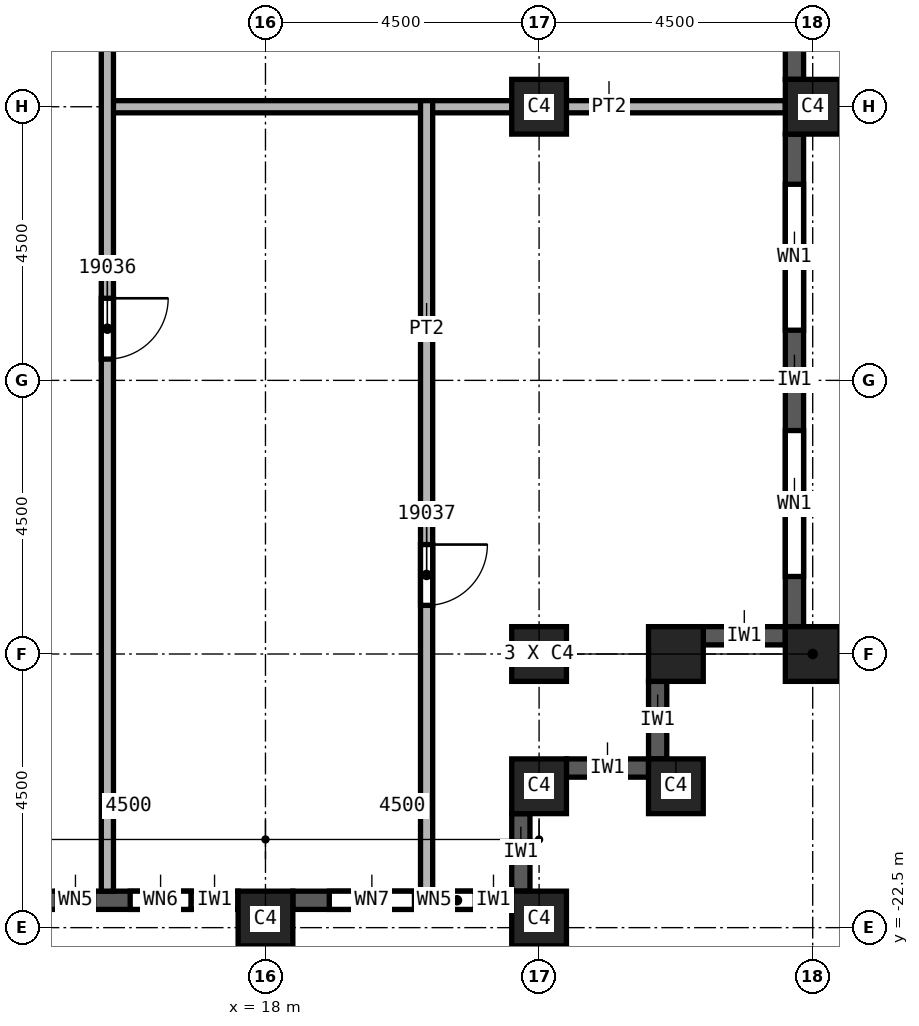
"""IFC4 building model, lengths in metres.
Left out: names, types, materials, properties, quantities, classifications, styles, units other than length and angle.
Written with IfcOpenShell. Run it as: python <this file> out.ifc"""

import sys

from ifc_helpers import new_model, si_unit, direction, frame, frame_2d, origin, origin_2d, place, context, subcontext, project, spatial, rectangle, extrude, element, fill, save


model = new_model("IFC4")
c1 = context("Model", 3, precision=1e-05, world=origin(), true_north=direction((0.0, 1.0)))
c2 = subcontext(c1, "Body", "Model", "MODEL_VIEW")
j1 = project(units=[si_unit("LENGTHUNIT", "METRE"), si_unit("PLANEANGLEUNIT", "RADIAN")], contexts=[c1])
p1 = place(None, origin())
s1 = spatial("IfcSite", under=j1, at=p1, CompositionType="ELEMENT")
p2 = place(p1, origin())
s2 = spatial("IfcBuilding", under=s1, at=p2, CompositionType="ELEMENT")
p3 = place(p2, frame((0.0, 0.0, 278.0)))
s3 = spatial("IfcBuildingStorey", under=s2, at=p3, CompositionType="ELEMENT", Elevation=278.0)
for number, where, z_axis, x_axis in (
    (1, (22.5, -9.0, 0.0), (0.0, 0.0, 1.0), (1.0, 0.0, 0.0)),
    (2, (22.5, -18.0, 0.0), (0.0, 0.0, 1.0), (1.0, 0.0, 0.0)),
    (3, (27.0, -9.0, 0.0), (0.0, 0.0, 1.0), (0.0, 1.0, 0.0)),
    (4, (27.0, -18.0, 0.0), (0.0, 0.0, 1.0), (0.0, 1.0, 0.0)),
    (5, (18.0, -22.35, 0.0), (0.0, 0.0, 1.0), (1.0, 0.0, 0.0)),
    (6, (22.5, -22.35, 0.0), (0.0, 0.0, 1.0), (1.0, 0.0, 0.0)),
    (7, (22.5, -20.175, 0.0), (0.0, 0.0, 1.0), (1.0, 0.0, 0.0)),
    (8, (24.75, -20.175, 0.0), (0.0, 0.0, 1.0), (1.0, 0.0, 0.0)),
    (9, (24.75, -18.0, 0.0), (0.0, 0.0, 1.0), (1.0, 0.0, 0.0)),
):
    element("IfcColumn", number, at=place(p3, frame(where, z_axis=z_axis, x_axis=x_axis)), inside=s3, PredefinedType="COLUMN", context=c2, shape_type="SweptSolid", body=[
        extrude(rectangle(XDim=0.9, YDim=0.9, at=origin_2d()), origin(), (0.0, 0.0, 1.0), 3.72),
    ])
p4 = place(p3, frame((13.95, -22.05, 0.0), z_axis=(0.0, 0.0, 1.0), x_axis=(1.0, 0.0, 0.0)))
e10 = element("IfcWall", 10, at=p4, inside=s3, PredefinedType="SOLIDWALL", context=c2, shape_type="SweptSolid", body=[
    extrude(rectangle(XDim=3.6, YDim=0.3, at=frame_2d((1.8, 0.0))), origin(), (0.0, 0.0, 1.0), 3.12),
])
p5 = place(p4, frame((0.625, 0.0, 0.8)))
e11 = element("IfcOpeningElement", 11, at=p5, cuts=e10, PredefinedType="OPENING", context=c2, shape_type="SweptSolid", body=[
    extrude(rectangle(XDim=0.6, YDim=1.95, at=frame_2d((0.3, 0.975))), frame((0.0, 0.15, 0.0), z_axis=(0.0, -1.0, 0.0), x_axis=(1.0, 0.0, 0.0)), (0.0, 0.0, 1.0), 0.3),
])
p6 = place(p4, frame((1.825, 0.0, 0.8)))
e12 = element("IfcOpeningElement", 12, at=p6, cuts=e10, PredefinedType="OPENING", context=c2, shape_type="SweptSolid", body=[
    extrude(rectangle(XDim=1.0, YDim=1.95, at=frame_2d((0.5, 0.975))), frame((0.0, 0.15, 0.0), z_axis=(0.0, -1.0, 0.0), x_axis=(1.0, 0.0, 0.0)), (0.0, 0.0, 1.0), 0.3),
])
p7 = place(p3, frame((18.45, -22.05, 0.0), z_axis=(0.0, 0.0, 1.0), x_axis=(1.0, 0.0, 0.0)))
e13 = element("IfcWall", 13, at=p7, inside=s3, PredefinedType="SOLIDWALL", context=c2, shape_type="SweptSolid", body=[
    extrude(rectangle(XDim=3.6, YDim=0.3, at=frame_2d((1.8, 0.0))), origin(), (0.0, 0.0, 1.0), 3.12),
])
p8 = place(p7, frame((0.6, 0.0, 0.8)))
e14 = element("IfcOpeningElement", 14, at=p8, cuts=e13, PredefinedType="OPENING", context=c2, shape_type="SweptSolid", body=[
    extrude(rectangle(XDim=1.4, YDim=1.95, at=frame_2d((0.7, 0.975))), frame((0.0, 0.15, 0.0), z_axis=(0.0, -1.0, 0.0), x_axis=(1.0, 0.0, 0.0)), (0.0, 0.0, 1.0), 0.3),
])
p9 = place(p7, frame((2.4, 0.0, 0.8)))
e15 = element("IfcOpeningElement", 15, at=p9, cuts=e13, PredefinedType="OPENING", context=c2, shape_type="SweptSolid", body=[
    extrude(rectangle(XDim=0.6, YDim=1.95, at=frame_2d((0.3, 0.975))), frame((0.0, 0.15, 0.0), z_axis=(0.0, -1.0, 0.0), x_axis=(1.0, 0.0, 0.0)), (0.0, 0.0, 1.0), 0.3),
])
p10 = place(p3, frame((22.2, -21.9, 0.0), z_axis=(0.0, 0.0, 1.0), x_axis=(0.0, 1.0, 0.0)))
e16 = element("IfcWall", 16, at=p10, inside=s3, PredefinedType="SOLIDWALL", context=c2, shape_type="SweptSolid", body=[
    extrude(rectangle(XDim=1.275, YDim=0.3, at=frame_2d((0.637, 0.0))), origin(), (0.0, 0.0, 1.0), 3.12),
])
p11 = place(p3, frame((22.95, -19.875, 0.0), z_axis=(0.0, 0.0, 1.0), x_axis=(1.0, 0.0, 0.0)))
e17 = element("IfcWall", 17, at=p11, inside=s3, PredefinedType="SOLIDWALL", context=c2, shape_type="SweptSolid", body=[
    extrude(rectangle(XDim=1.35, YDim=0.3, at=frame_2d((0.675, 0.0))), origin(), (0.0, 0.0, 1.0), 3.12),
])
p12 = place(p3, frame((24.45, -19.725, 0.0), z_axis=(0.0, 0.0, 1.0), x_axis=(0.0, 1.0, 0.0)))
e18 = element("IfcWall", 18, at=p12, inside=s3, PredefinedType="SOLIDWALL", context=c2, shape_type="SweptSolid", body=[
    extrude(rectangle(XDim=1.275, YDim=0.3, at=frame_2d((0.638, 0.0))), origin(), (0.0, 0.0, 1.0), 3.12),
])
p13 = place(p3, frame((25.2, -17.7, 0.0), z_axis=(0.0, 0.0, 1.0), x_axis=(1.0, 0.0, 0.0)))
e19 = element("IfcWall", 19, at=p13, inside=s3, PredefinedType="SOLIDWALL", context=c2, shape_type="SweptSolid", body=[
    extrude(rectangle(XDim=1.35, YDim=0.3, at=frame_2d((0.675, 0.0))), origin(), (0.0, 0.0, 1.0), 3.12),
])
p14 = place(p3, frame((26.7, -17.55, 0.0), z_axis=(0.0, 0.0, 1.0), x_axis=(0.0, 1.0, 0.0)))
e20 = element("IfcWall", 20, at=p14, inside=s3, PredefinedType="SOLIDWALL", context=c2, shape_type="SweptSolid", body=[
    extrude(rectangle(XDim=8.1, YDim=0.3, at=frame_2d((4.05, 0.0))), origin(), (0.0, 0.0, 1.0), 3.12),
])
p15 = place(p14, frame((0.825, 0.0, 0.8)))
e21 = element("IfcOpeningElement", 21, at=p15, cuts=e20, PredefinedType="OPENING", context=c2, shape_type="SweptSolid", body=[
    extrude(rectangle(XDim=2.4, YDim=1.95, at=frame_2d((1.2, 0.975))), frame((0.0, 0.15, 0.0), z_axis=(0.0, -1.0, 0.0), x_axis=(1.0, 0.0, 0.0)), (0.0, 0.0, 1.0), 0.3),
])
p16 = place(p14, frame((4.875, 0.0, 0.8)))
e22 = element("IfcOpeningElement", 22, at=p16, cuts=e20, PredefinedType="OPENING", context=c2, shape_type="SweptSolid", body=[
    extrude(rectangle(XDim=2.4, YDim=1.95, at=frame_2d((1.2, 0.975))), frame((0.0, 0.15, 0.0), z_axis=(0.0, -1.0, 0.0), x_axis=(1.0, 0.0, 0.0)), (0.0, 0.0, 1.0), 0.3),
])
p17 = place(p3, frame((26.7, -8.55, 0.0), z_axis=(0.0, 0.0, 1.0), x_axis=(0.0, 1.0, 0.0)))
e23 = element("IfcWall", 23, at=p17, inside=s3, PredefinedType="SOLIDWALL", context=c2, shape_type="SweptSolid", body=[
    extrude(rectangle(XDim=8.1, YDim=0.3, at=frame_2d((4.05, 0.0))), origin(), (0.0, 0.0, 1.0), 3.12),
])
p18 = place(p17, frame((0.825, 0.0, 0.8)))
e24 = element("IfcOpeningElement", 24, at=p18, cuts=e23, PredefinedType="OPENING", context=c2, shape_type="SweptSolid", body=[
    extrude(rectangle(XDim=2.4, YDim=1.95, at=frame_2d((1.2, 0.975))), frame((0.0, 0.15, 0.0), z_axis=(0.0, -1.0, 0.0), x_axis=(1.0, 0.0, 0.0)), (0.0, 0.0, 1.0), 0.3),
])
p19 = place(p17, frame((4.875, 0.0, 0.8)))
e25 = element("IfcOpeningElement", 25, at=p19, cuts=e23, PredefinedType="OPENING", context=c2, shape_type="SweptSolid", body=[
    extrude(rectangle(XDim=2.4, YDim=1.95, at=frame_2d((1.2, 0.975))), frame((0.0, 0.15, 0.0), z_axis=(0.0, -1.0, 0.0), x_axis=(1.0, 0.0, 0.0)), (0.0, 0.0, 1.0), 0.3),
])
p20 = place(p3, frame((15.4, -9.0, 0.0), z_axis=(0.0, 0.0, 1.0), x_axis=(1.0, 0.0, 0.0)))
e26 = element("IfcWall", 26, at=p20, inside=s3, PredefinedType="PARTITIONING", context=c2, shape_type="SweptSolid", body=[
    extrude(rectangle(XDim=11.15, YDim=0.2, at=frame_2d((5.575, 0.0))), origin(), (0.0, 0.0, 1.0), 3.72),
])
p21 = place(p3, frame((15.4, 21.9, 0.0), z_axis=(0.0, 0.0, 1.0), x_axis=(0.0, -1.0, 0.0)))
e27 = element("IfcWall", 27, at=p21, inside=s3, PredefinedType="PARTITIONING", context=c2, shape_type="SweptSolid", body=[
    extrude(rectangle(XDim=43.8, YDim=0.2, at=frame_2d((21.9, 0.0))), origin(), (0.0, 0.0, 1.0), 3.72),
])
p22 = place(p21, frame((17.85, 0.0, 0.0)))
e28 = element("IfcOpeningElement", 28, at=p22, cuts=e27, PredefinedType="OPENING", context=c2, shape_type="SweptSolid", body=[
    extrude(rectangle(XDim=1.0, YDim=2.1, at=frame_2d((0.5, 1.05))), frame((0.0, 0.1, 0.0), z_axis=(0.0, -1.0, 0.0), x_axis=(1.0, 0.0, 0.0)), (0.0, 0.0, 1.0), 0.2),
])
p23 = place(p21, frame((10.2, 0.0, 0.0)))
e29 = element("IfcOpeningElement", 29, at=p23, cuts=e27, PredefinedType="OPENING", context=c2, shape_type="SweptSolid", body=[
    extrude(rectangle(XDim=1.0, YDim=2.1, at=frame_2d((0.5, 1.05))), frame((0.0, 0.1, 0.0), z_axis=(0.0, -1.0, 0.0), x_axis=(1.0, 0.0, 0.0)), (0.0, 0.0, 1.0), 0.2),
])
p24 = place(p21, frame((2.8, 0.0, 0.0)))
e30 = element("IfcOpeningElement", 30, at=p24, cuts=e27, PredefinedType="OPENING", context=c2, shape_type="SweptSolid", body=[
    extrude(rectangle(XDim=1.0, YDim=2.1, at=frame_2d((0.5, 1.05))), frame((0.0, 0.1, 0.0), z_axis=(0.0, -1.0, 0.0), x_axis=(1.0, 0.0, 0.0)), (0.0, 0.0, 1.0), 0.2),
])
p25 = place(p21, frame((34.05, 0.0, 0.0)))
e31 = element("IfcOpeningElement", 31, at=p25, cuts=e27, PredefinedType="OPENING", context=c2, shape_type="SweptSolid", body=[
    extrude(rectangle(XDim=1.0, YDim=2.1, at=frame_2d((0.5, 1.05))), frame((0.0, 0.1, 0.0), z_axis=(0.0, -1.0, 0.0), x_axis=(1.0, 0.0, 0.0)), (0.0, 0.0, 1.0), 0.2),
])
p26 = place(p21, frame((27.75, 0.0, 0.0)))
e32 = element("IfcOpeningElement", 32, at=p26, cuts=e27, PredefinedType="OPENING", context=c2, shape_type="SweptSolid", body=[
    extrude(rectangle(XDim=1.0, YDim=2.1, at=frame_2d((0.5, 1.05))), frame((0.0, 0.1, 0.0), z_axis=(0.0, -1.0, 0.0), x_axis=(1.0, 0.0, 0.0)), (0.0, 0.0, 1.0), 0.2),
])
p27 = place(p3, frame((20.65, -8.9, 0.0), z_axis=(0.0, 0.0, 1.0), x_axis=(0.0, -1.0, 0.0)))
e33 = element("IfcWall", 33, at=p27, inside=s3, PredefinedType="PARTITIONING", context=c2, shape_type="SweptSolid", body=[
    extrude(rectangle(XDim=13.0, YDim=0.2, at=frame_2d((6.5, 0.0))), origin(), (0.0, 0.0, 1.0), 3.72),
])
p28 = place(p27, frame((7.3, 0.0, 0.0)))
e34 = element("IfcOpeningElement", 34, at=p28, cuts=e33, PredefinedType="OPENING", context=c2, shape_type="SweptSolid", body=[
    extrude(rectangle(XDim=1.0, YDim=2.1, at=frame_2d((0.5, 1.05))), frame((0.0, 0.1, 0.0), z_axis=(0.0, -1.0, 0.0), x_axis=(1.0, 0.0, 0.0)), (0.0, 0.0, 1.0), 0.2),
])
p29 = place(p15, origin())
e35 = element("IfcWindow", 35, at=p29, inside=s3, PartitioningType="SINGLE_PANEL", PredefinedType="WINDOW", context=c2, shape_type="SweptSolid", body=[
    extrude(rectangle(XDim=2.4, YDim=1.95, at=frame_2d((1.2, 0.975))), frame((0.0, 0.03, 0.0), z_axis=(0.0, -1.0, 0.0), x_axis=(1.0, 0.0, 0.0)), (0.0, 0.0, 1.0), 0.06),
])
fill(e21, e35)
p30 = place(p16, origin())
e36 = element("IfcWindow", 36, at=p30, inside=s3, PartitioningType="SINGLE_PANEL", PredefinedType="WINDOW", context=c2, shape_type="SweptSolid", body=[
    extrude(rectangle(XDim=2.4, YDim=1.95, at=frame_2d((1.2, 0.975))), frame((0.0, 0.03, 0.0), z_axis=(0.0, -1.0, 0.0), x_axis=(1.0, 0.0, 0.0)), (0.0, 0.0, 1.0), 0.06),
])
fill(e22, e36)
p31 = place(p25, origin())
e37 = element("IfcDoor", 37, at=p31, inside=s3, OperationType="SINGLE_SWING_LEFT", PredefinedType="DOOR", context=c2, shape_type="SweptSolid", body=[
    extrude(rectangle(XDim=1.0, YDim=2.1, at=frame_2d((0.5, 1.05))), frame((0.0, 0.025, 0.0), z_axis=(0.0, -1.0, 0.0), x_axis=(1.0, 0.0, 0.0)), (0.0, 0.0, 1.0), 0.05),
])
fill(e31, e37)
p32 = place(p28, origin())
e38 = element("IfcDoor", 38, at=p32, inside=s3, OperationType="SINGLE_SWING_RIGHT", PredefinedType="DOOR", context=c2, shape_type="SweptSolid", body=[
    extrude(rectangle(XDim=1.0, YDim=2.1, at=frame_2d((0.5, 1.05))), frame((0.0, 0.025, 0.0), z_axis=(0.0, -1.0, 0.0), x_axis=(1.0, 0.0, 0.0)), (0.0, 0.0, 1.0), 0.05),
])
fill(e34, e38)
p33 = place(p5, origin())
e39 = element("IfcWindow", 39, at=p33, inside=s3, PartitioningType="SINGLE_PANEL", PredefinedType="WINDOW", context=c2, shape_type="SweptSolid", body=[
    extrude(rectangle(XDim=0.6, YDim=1.95, at=frame_2d((0.3, 0.975))), frame((0.0, 0.03, 0.0), z_axis=(0.0, -1.0, 0.0), x_axis=(1.0, 0.0, 0.0)), (0.0, 0.0, 1.0), 0.06),
])
fill(e11, e39)
p34 = place(p6, origin())
e40 = element("IfcWindow", 40, at=p34, inside=s3, PartitioningType="SINGLE_PANEL", PredefinedType="WINDOW", context=c2, shape_type="SweptSolid", body=[
    extrude(rectangle(XDim=1.0, YDim=1.95, at=frame_2d((0.5, 0.975))), frame((0.0, 0.03, 0.0), z_axis=(0.0, -1.0, 0.0), x_axis=(1.0, 0.0, 0.0)), (0.0, 0.0, 1.0), 0.06),
])
fill(e12, e40)
p35 = place(p8, origin())
e41 = element("IfcWindow", 41, at=p35, inside=s3, PartitioningType="SINGLE_PANEL", PredefinedType="WINDOW", context=c2, shape_type="SweptSolid", body=[
    extrude(rectangle(XDim=1.4, YDim=1.95, at=frame_2d((0.7, 0.975))), frame((0.0, 0.03, 0.0), z_axis=(0.0, -1.0, 0.0), x_axis=(1.0, 0.0, 0.0)), (0.0, 0.0, 1.0), 0.06),
])
fill(e14, e41)
p36 = place(p9, origin())
e42 = element("IfcWindow", 42, at=p36, inside=s3, PartitioningType="SINGLE_PANEL", PredefinedType="WINDOW", context=c2, shape_type="SweptSolid", body=[
    extrude(rectangle(XDim=0.6, YDim=1.95, at=frame_2d((0.3, 0.975))), frame((0.0, 0.03, 0.0), z_axis=(0.0, -1.0, 0.0), x_axis=(1.0, 0.0, 0.0)), (0.0, 0.0, 1.0), 0.06),
])
fill(e15, e42)
save(model, sys.argv[1])
